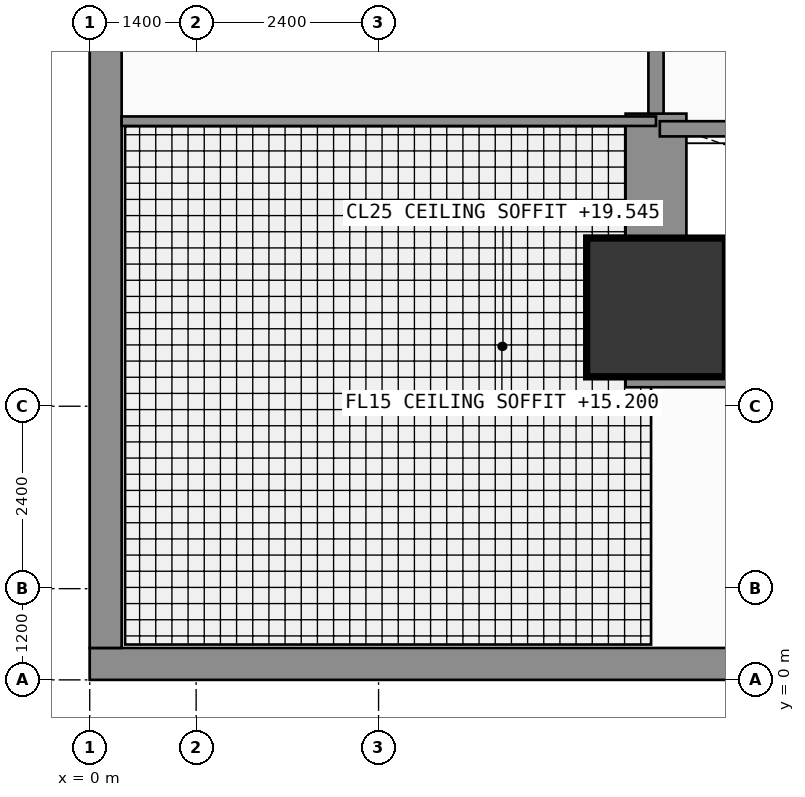
"""IFC4 building model, lengths in metres.
Left out: names, types, materials, properties, quantities, classifications, styles, units other than length and angle.
Written with IfcOpenShell. Run it as: python <this file> out.ifc"""

import sys

from ifc_helpers import new_model, si_unit, direction, frame, frame_2d, origin, origin_2d, place, context, subcontext, project, spatial, rectangle, extrude, element, fill, save


model = new_model("IFC4")
c1 = context("Model", 3, precision=1e-05, world=origin(), true_north=direction((0.0, 1.0)))
c2 = subcontext(c1, "Body", "Model", "MODEL_VIEW")
j1 = project(units=[si_unit("LENGTHUNIT", "METRE"), si_unit("PLANEANGLEUNIT", "RADIAN")], contexts=[c1])
p1 = place(None, origin())
s1 = spatial("IfcSite", under=j1, at=p1, CompositionType="ELEMENT")
p2 = place(p1, origin())
s2 = spatial("IfcBuilding", under=s1, at=p2, CompositionType="ELEMENT")
p3 = place(p2, frame((0.0, 0.0, 15.2)))
s3 = spatial("IfcBuildingStorey", under=s2, at=p3, CompositionType="ELEMENT", Elevation=15.2)
p4 = place(p3, frame((7.05, 4.25, 0.0), z_axis=(0.0, 0.0, 1.0), x_axis=(1.0, 0.0, 0.0)))
e1 = element("IfcWall", 1, at=p4, inside=s3, PredefinedType="SHEAR", context=c2, shape_type="SweptSolid", body=[
    extrude(rectangle(XDim=14.15, YDim=0.8, at=frame_2d((7.075, 0.0))), origin(), (0.0, 0.0, 1.0), 4.46),
])
p5 = place(p3, frame((7.45, 4.65, 0.0), z_axis=(0.0, 0.0, 1.0), x_axis=(0.0, 1.0, 0.0)))
e2 = element("IfcWall", 2, at=p5, inside=s3, PredefinedType="SHEAR", context=c2, shape_type="SweptSolid", body=[
    extrude(rectangle(XDim=2.8, YDim=0.8, at=frame_2d((1.4, 0.0))), origin(), (0.0, 0.0, 1.0), 4.46),
])
p6 = place(p3, frame((7.45, 4.9, 0.0), z_axis=(0.0, 0.0, 1.0), x_axis=(1.0, 0.0, 0.0)))
e3 = element("IfcColumn", 3, at=p6, inside=s3, PredefinedType="COLUMN", context=c2, shape_type="SweptSolid", body=[
    extrude(rectangle(XDim=1.8, YDim=1.8, at=origin_2d()), origin(), (0.0, 0.0, 1.0), 4.46),
])
p7 = place(p3, frame((0.0, 0.21, 0.0), z_axis=(0.0, 0.0, 1.0), x_axis=(1.0, 0.0, 0.0)))
e4 = element("IfcWall", 4, at=p7, inside=s3, PredefinedType="SOLIDWALL", context=c2, shape_type="SweptSolid", body=[
    extrude(rectangle(XDim=64.8, YDim=0.42, at=frame_2d((32.4, 0.0))), origin(), (0.0, 0.0, 1.0), 4.46),
])
p8 = place(p7, frame((8.0, 0.0, 0.95)))
e5 = element("IfcOpeningElement", 5, at=p8, cuts=e4, PredefinedType="OPENING", context=c2, shape_type="SweptSolid", body=[
    extrude(rectangle(XDim=2.4, YDim=2.1, at=frame_2d((1.2, 1.05))), frame((0.0, 0.22, 0.0), z_axis=(0.0, -1.0, 0.0), x_axis=(1.0, 0.0, 0.0)), (0.0, 0.0, 1.0), 0.44),
])
p9 = place(p7, frame((16.0, 0.0, 0.95)))
e6 = element("IfcOpeningElement", 6, at=p9, cuts=e4, PredefinedType="OPENING", context=c2, shape_type="SweptSolid", body=[
    extrude(rectangle(XDim=2.4, YDim=2.1, at=frame_2d((1.2, 1.05))), frame((0.0, 0.22, 0.0), z_axis=(0.0, -1.0, 0.0), x_axis=(1.0, 0.0, 0.0)), (0.0, 0.0, 1.0), 0.44),
])
p10 = place(p7, frame((24.0, 0.0, 0.95)))
e7 = element("IfcOpeningElement", 7, at=p10, cuts=e4, PredefinedType="OPENING", context=c2, shape_type="SweptSolid", body=[
    extrude(rectangle(XDim=2.4, YDim=2.1, at=frame_2d((1.2, 1.05))), frame((0.0, 0.22, 0.0), z_axis=(0.0, -1.0, 0.0), x_axis=(1.0, 0.0, 0.0)), (0.0, 0.0, 1.0), 0.44),
])
p11 = place(p7, frame((34.0, 0.0, 0.95)))
e8 = element("IfcOpeningElement", 8, at=p11, cuts=e4, PredefinedType="OPENING", context=c2, shape_type="SweptSolid", body=[
    extrude(rectangle(XDim=2.4, YDim=2.1, at=frame_2d((1.2, 1.05))), frame((0.0, 0.22, 0.0), z_axis=(0.0, -1.0, 0.0), x_axis=(1.0, 0.0, 0.0)), (0.0, 0.0, 1.0), 0.44),
])
p12 = place(p7, frame((44.5, 0.0, 0.95)))
e9 = element("IfcOpeningElement", 9, at=p12, cuts=e4, PredefinedType="OPENING", context=c2, shape_type="SweptSolid", body=[
    extrude(rectangle(XDim=2.4, YDim=2.1, at=frame_2d((1.2, 1.05))), frame((0.0, 0.22, 0.0), z_axis=(0.0, -1.0, 0.0), x_axis=(1.0, 0.0, 0.0)), (0.0, 0.0, 1.0), 0.44),
])
p13 = place(p7, frame((58.0, 0.0, 0.95)))
e10 = element("IfcOpeningElement", 10, at=p13, cuts=e4, PredefinedType="OPENING", context=c2, shape_type="SweptSolid", body=[
    extrude(rectangle(XDim=2.4, YDim=2.1, at=frame_2d((1.2, 1.05))), frame((0.0, 0.22, 0.0), z_axis=(0.0, -1.0, 0.0), x_axis=(1.0, 0.0, 0.0)), (0.0, 0.0, 1.0), 0.44),
])
p14 = place(p3, frame((0.21, 0.42, 0.0), z_axis=(0.0, 0.0, 1.0), x_axis=(0.0, 1.0, 0.0)))
e11 = element("IfcWall", 11, at=p14, inside=s3, PredefinedType="SOLIDWALL", context=c2, shape_type="SweptSolid", body=[
    extrude(rectangle(XDim=50.78, YDim=0.42, at=frame_2d((25.39, 0.0))), origin(), (0.0, 0.0, 1.0), 4.46),
])
p15 = place(p14, frame((8.0, 0.0, 0.95)))
e12 = element("IfcOpeningElement", 12, at=p15, cuts=e11, PredefinedType="OPENING", context=c2, shape_type="SweptSolid", body=[
    extrude(rectangle(XDim=2.4, YDim=2.1, at=frame_2d((1.2, 1.05))), frame((0.0, 0.22, 0.0), z_axis=(0.0, -1.0, 0.0), x_axis=(1.0, 0.0, 0.0)), (0.0, 0.0, 1.0), 0.44),
])
p16 = place(p14, frame((18.0, 0.0, 0.95)))
e13 = element("IfcOpeningElement", 13, at=p16, cuts=e11, PredefinedType="OPENING", context=c2, shape_type="SweptSolid", body=[
    extrude(rectangle(XDim=2.4, YDim=2.1, at=frame_2d((1.2, 1.05))), frame((0.0, 0.22, 0.0), z_axis=(0.0, -1.0, 0.0), x_axis=(1.0, 0.0, 0.0)), (0.0, 0.0, 1.0), 0.44),
])
p17 = place(p14, frame((27.5, 0.0, 0.95)))
e14 = element("IfcOpeningElement", 14, at=p17, cuts=e11, PredefinedType="OPENING", context=c2, shape_type="SweptSolid", body=[
    extrude(rectangle(XDim=2.4, YDim=2.1, at=frame_2d((1.2, 1.05))), frame((0.0, 0.22, 0.0), z_axis=(0.0, -1.0, 0.0), x_axis=(1.0, 0.0, 0.0)), (0.0, 0.0, 1.0), 0.44),
])
p18 = place(p14, frame((45.0, 0.0, 0.95)))
e15 = element("IfcOpeningElement", 15, at=p18, cuts=e11, PredefinedType="OPENING", context=c2, shape_type="SweptSolid", body=[
    extrude(rectangle(XDim=2.4, YDim=2.1, at=frame_2d((1.2, 1.05))), frame((0.0, 0.22, 0.0), z_axis=(0.0, -1.0, 0.0), x_axis=(1.0, 0.0, 0.0)), (0.0, 0.0, 1.0), 0.44),
])
p19 = place(p3, frame((7.5, 7.25, 0.0), z_axis=(0.0, 0.0, 1.0), x_axis=(1.0, 0.0, 0.0)))
e16 = element("IfcWall", 16, at=p19, inside=s3, PredefinedType="PARTITIONING", context=c2, shape_type="SweptSolid", body=[
    extrude(rectangle(XDim=8.35, YDim=0.2, at=frame_2d((4.175, 0.0))), origin(), (0.0, 0.0, 1.0), 4.46),
])
p20 = place(p19, frame((0.53, 0.0, 0.0)))
e17 = element("IfcOpeningElement", 17, at=p20, cuts=e16, PredefinedType="OPENING", context=c2, shape_type="SweptSolid", body=[
    extrude(rectangle(XDim=1.1, YDim=2.2, at=frame_2d((0.55, 1.1))), frame((0.0, 0.11, 0.0), z_axis=(0.0, -1.0, 0.0), x_axis=(1.0, 0.0, 0.0)), (0.0, 0.0, 1.0), 0.22),
])
p21 = place(p19, frame((2.37, 0.0, 0.0)))
e18 = element("IfcOpeningElement", 18, at=p21, cuts=e16, PredefinedType="OPENING", context=c2, shape_type="SweptSolid", body=[
    extrude(rectangle(XDim=1.1, YDim=2.2, at=frame_2d((0.55, 1.1))), frame((0.0, 0.11, 0.0), z_axis=(0.0, -1.0, 0.0), x_axis=(1.0, 0.0, 0.0)), (0.0, 0.0, 1.0), 0.22),
])
p22 = place(p19, frame((4.33, 0.0, 0.0)))
e19 = element("IfcOpeningElement", 19, at=p22, cuts=e16, PredefinedType="OPENING", context=c2, shape_type="SweptSolid", body=[
    extrude(rectangle(XDim=1.1, YDim=2.2, at=frame_2d((0.55, 1.1))), frame((0.0, 0.11, 0.0), z_axis=(0.0, -1.0, 0.0), x_axis=(1.0, 0.0, 0.0)), (0.0, 0.0, 1.0), 0.22),
])
p23 = place(p19, frame((6.5, 0.0, 0.0)))
e20 = element("IfcOpeningElement", 20, at=p23, cuts=e16, PredefinedType="OPENING", context=c2, shape_type="SweptSolid", body=[
    extrude(rectangle(XDim=1.1, YDim=2.2, at=frame_2d((0.55, 1.1))), frame((0.0, 0.11, 0.0), z_axis=(0.0, -1.0, 0.0), x_axis=(1.0, 0.0, 0.0)), (0.0, 0.0, 1.0), 0.22),
])
p24 = place(p3, frame((7.45, 7.45, 0.0), z_axis=(0.0, 0.0, 1.0), x_axis=(0.0, 1.0, 0.0)))
e21 = element("IfcWall", 21, at=p24, inside=s3, PredefinedType="PARTITIONING", context=c2, shape_type="SweptSolid", body=[
    extrude(rectangle(XDim=2.3, YDim=0.2, at=frame_2d((1.15, 0.0))), origin(), (0.0, 0.0, 1.0), 3.24),
])
p25 = place(p24, frame((0.633, 0.0, 0.0)))
e22 = element("IfcOpeningElement", 22, at=p25, cuts=e21, PredefinedType="OPENING", context=c2, shape_type="SweptSolid", body=[
    extrude(rectangle(XDim=1.2, YDim=2.25, at=frame_2d((0.6, 1.125))), frame((0.0, 0.11, 0.0), z_axis=(0.0, -1.0, 0.0), x_axis=(1.0, 0.0, 0.0)), (0.0, 0.0, 1.0), 0.22),
])
p26 = place(p3, frame((0.42, 7.35, 0.0), z_axis=(0.0, 0.0, 1.0), x_axis=(1.0, 0.0, 0.0)))
e23 = element("IfcWall", 23, at=p26, inside=s3, PredefinedType="PARTITIONING", context=c2, shape_type="SweptSolid", body=[
    extrude(rectangle(XDim=7.03, YDim=0.125, at=frame_2d((3.515, 0.0))), origin(), (0.0, 0.0, 1.0), 4.46),
])
p27 = place(p26, frame((4.78, 0.0, 0.0)))
e24 = element("IfcOpeningElement", 24, at=p27, cuts=e23, PredefinedType="OPENING", context=c2, shape_type="SweptSolid", body=[
    extrude(rectangle(XDim=0.95, YDim=2.15, at=frame_2d((0.475, 1.075))), frame((0.0, 0.073, 0.0), z_axis=(0.0, -1.0, 0.0), x_axis=(1.0, 0.0, 0.0)), (0.0, 0.0, 1.0), 0.145),
])
p28 = place(p8, origin())
e25 = element("IfcWindow", 25, at=p28, inside=s3, PartitioningType="SINGLE_PANEL", PredefinedType="WINDOW", context=c2, shape_type="SweptSolid", body=[
    extrude(rectangle(XDim=2.4, YDim=2.1, at=frame_2d((1.2, 1.05))), frame((0.0, 0.03, 0.0), z_axis=(0.0, -1.0, 0.0), x_axis=(1.0, 0.0, 0.0)), (0.0, 0.0, 1.0), 0.06),
])
fill(e5, e25)
p29 = place(p20, origin())
e26 = element("IfcDoor", 26, at=p29, inside=s3, OperationType="SLIDING_TO_LEFT", PredefinedType="DOOR", context=c2, shape_type="SweptSolid", body=[
    extrude(rectangle(XDim=1.1, YDim=2.2, at=frame_2d((0.55, 1.1))), frame((0.0, 0.025, 0.0), z_axis=(0.0, -1.0, 0.0), x_axis=(1.0, 0.0, 0.0)), (0.0, 0.0, 1.0), 0.05),
])
fill(e17, e26)
p30 = place(p25, frame((1.2, 0.0, 0.0), z_axis=(0.0, 0.0, 1.0), x_axis=(-1.0, 0.0, 0.0)))
e27 = element("IfcDoor", 27, at=p30, inside=s3, OperationType="SINGLE_SWING_LEFT", PredefinedType="DOOR", context=c2, shape_type="SweptSolid", body=[
    extrude(rectangle(XDim=1.2, YDim=2.25, at=frame_2d((0.6, 1.125))), frame((0.0, 0.025, 0.0), z_axis=(0.0, -1.0, 0.0), x_axis=(1.0, 0.0, 0.0)), (0.0, 0.0, 1.0), 0.05),
])
fill(e22, e27)
p31 = place(p27, origin())
e28 = element("IfcDoor", 28, at=p31, inside=s3, OperationType="SINGLE_SWING_LEFT", PredefinedType="DOOR", context=c2, shape_type="SweptSolid", body=[
    extrude(rectangle(XDim=0.95, YDim=2.15, at=frame_2d((0.475, 1.075))), frame((0.0, 0.025, 0.0), z_axis=(0.0, -1.0, 0.0), x_axis=(1.0, 0.0, 0.0)), (0.0, 0.0, 1.0), 0.05),
])
fill(e24, e28)
save(model, sys.argv[1])
